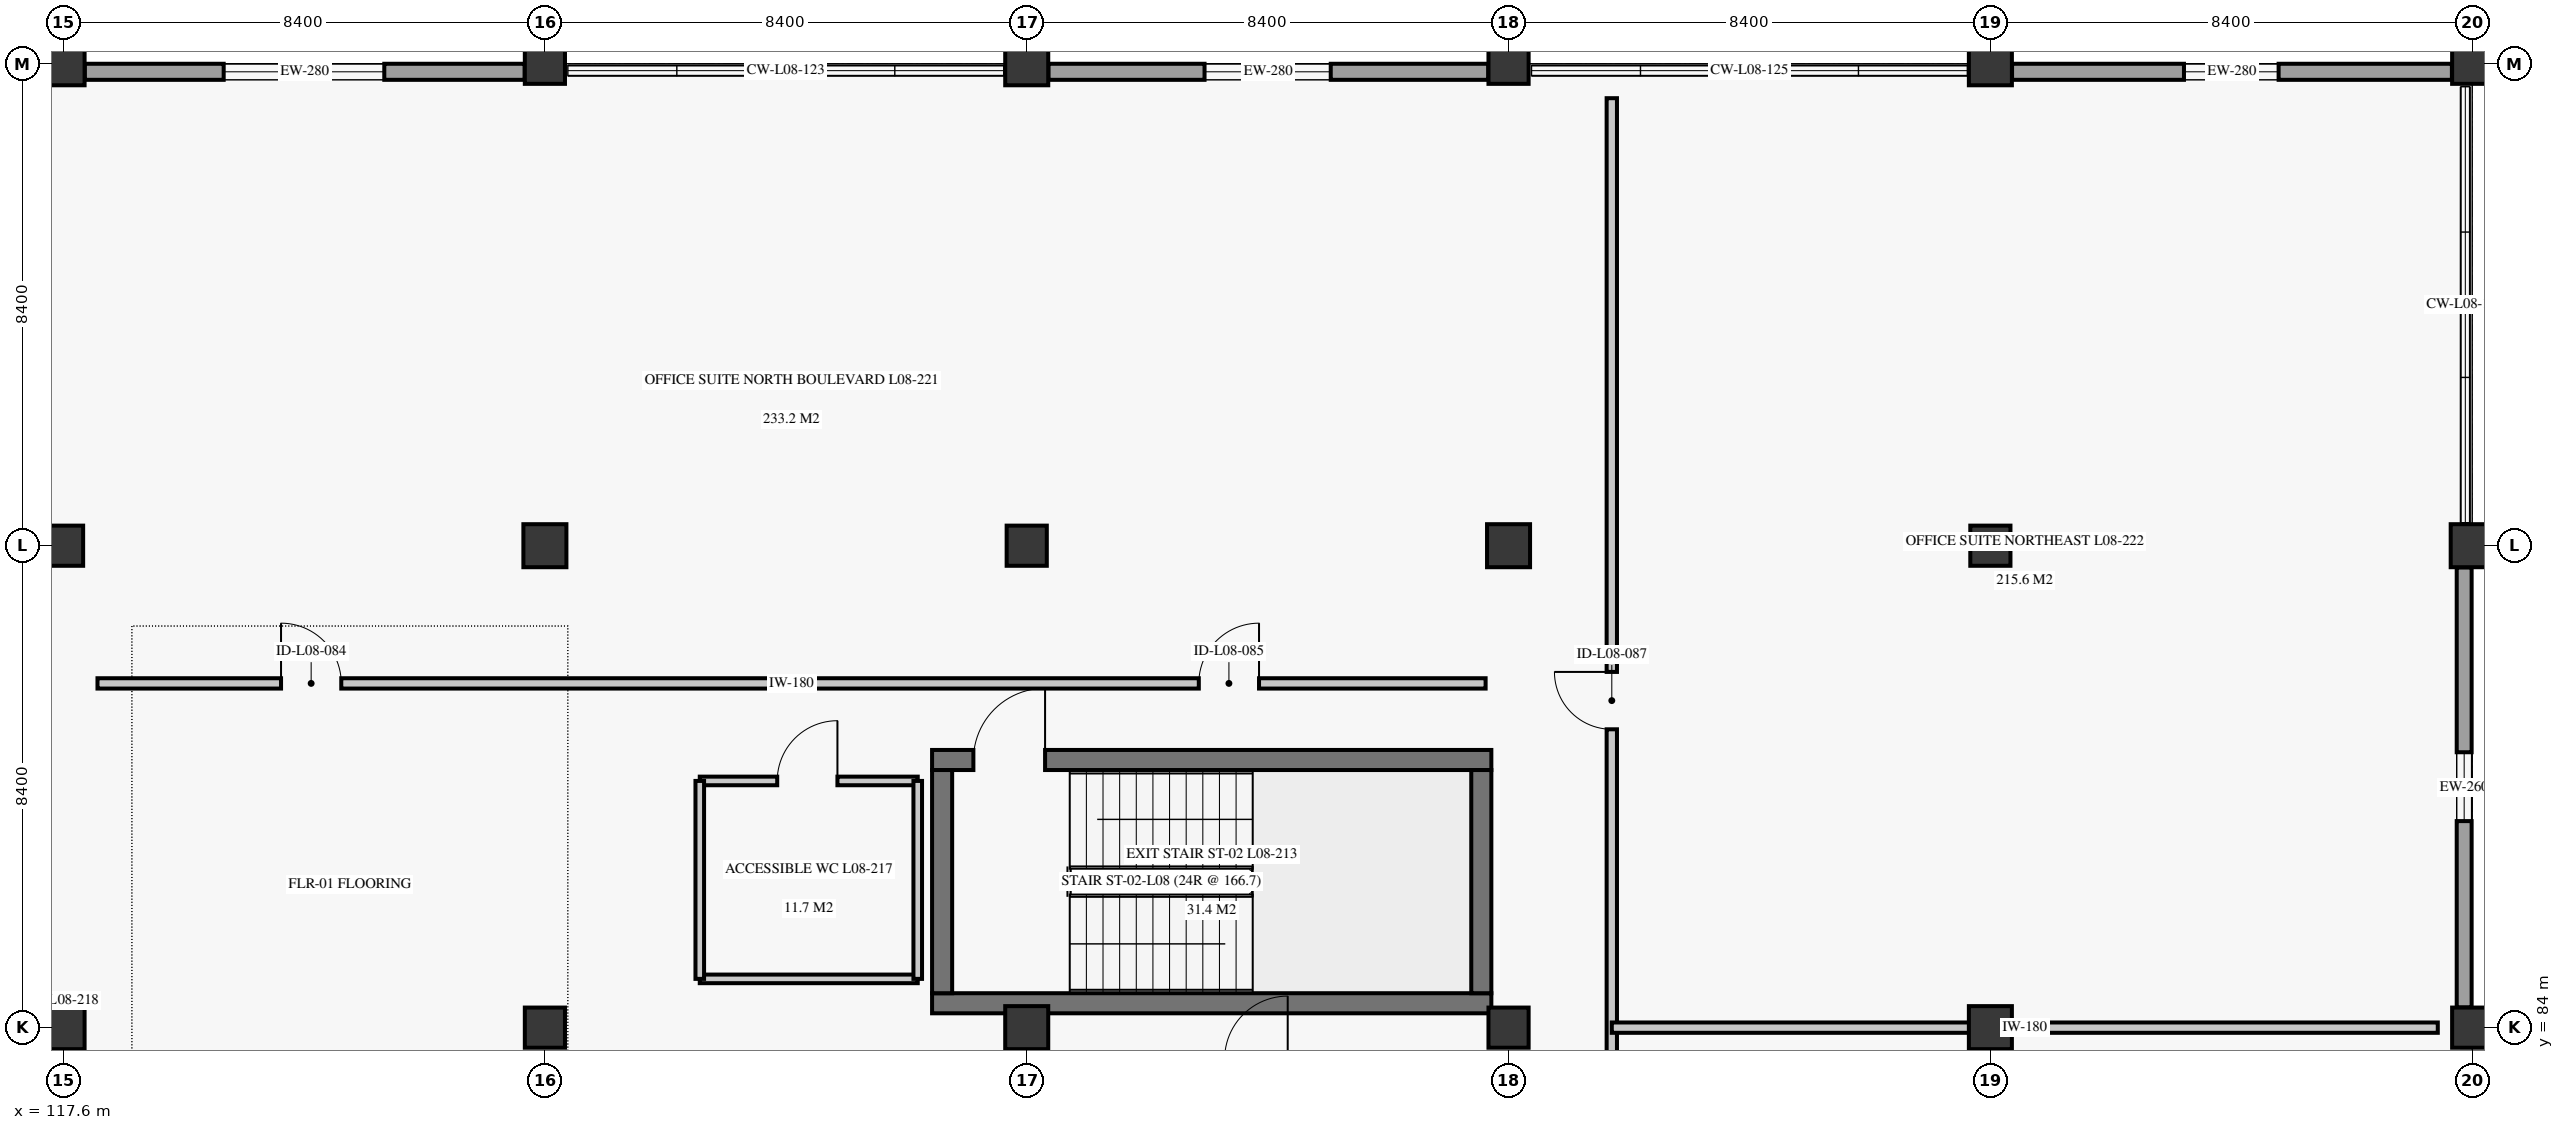
"""IFC4 building model, lengths in metres.
Left out: names, types, materials, properties, quantities, classifications, styles, units other than length and angle.
Written with IfcOpenShell. Run it as: python <this file> out.ifc"""

import sys

from ifc_helpers import new_model, si_unit, direction, frame, frame_2d, origin, origin_2d, place, context, subcontext, project, spatial, rectangle, extrude, element, fill, save


model = new_model("IFC4")
c1 = context("Model", 3, precision=1e-05, world=origin(), true_north=direction((0.0, 1.0)))
c2 = subcontext(c1, "Body", "Model", "MODEL_VIEW")
j1 = project(units=[si_unit("LENGTHUNIT", "METRE"), si_unit("PLANEANGLEUNIT", "RADIAN")], contexts=[c1])
p1 = place(None, origin())
s1 = spatial("IfcSite", under=j1, at=p1, CompositionType="ELEMENT")
p2 = place(p1, origin())
s2 = spatial("IfcBuilding", under=s1, at=p2, CompositionType="ELEMENT")
p3 = place(p2, frame((0.0, 0.0, 34.7)))
s3 = spatial("IfcBuildingStorey", under=s2, at=p3, CompositionType="ELEMENT", Elevation=34.7)
p4 = place(p3, frame((117.6, 84.0, 0.0), z_axis=(0.0, 0.0, 1.0), x_axis=(1.0, 0.0, 0.0)))
e1 = element("IfcColumn", 1, at=p4, inside=s3, PredefinedType="COLUMN", context=c2, shape_type="SweptSolid", body=[
    extrude(rectangle(XDim=0.75, YDim=0.75, at=origin_2d()), origin(), (0.0, 0.0, 1.0), 3.72),
])
p5 = place(p3, frame((117.6, 92.4, 0.0), z_axis=(0.0, 0.0, 1.0), x_axis=(1.0, 0.0, 0.0)))
e2 = element("IfcColumn", 2, at=p5, inside=s3, PredefinedType="COLUMN", context=c2, shape_type="SweptSolid", body=[
    extrude(rectangle(XDim=0.7, YDim=0.7, at=origin_2d()), origin(), (0.0, 0.0, 1.0), 3.72),
])
p6 = place(p3, frame((117.6, 100.8, 0.0), z_axis=(0.0, 0.0, 1.0), x_axis=(1.0, 0.0, 0.0)))
e3 = element("IfcColumn", 3, at=p6, inside=s3, PredefinedType="COLUMN", context=c2, shape_type="SweptSolid", body=[
    extrude(rectangle(XDim=0.75, YDim=0.75, at=origin_2d()), origin(), (0.0, 0.0, 1.0), 3.72),
])
p7 = place(p3, frame((126.0, 84.0, 0.0), z_axis=(0.0, 0.0, 1.0), x_axis=(1.0, 0.0, 0.0)))
e4 = element("IfcColumn", 4, at=p7, inside=s3, PredefinedType="COLUMN", context=c2, shape_type="SweptSolid", body=[
    extrude(rectangle(XDim=0.7, YDim=0.7, at=origin_2d()), origin(), (0.0, 0.0, 1.0), 3.72),
])
p8 = place(p3, frame((126.0, 92.4, 0.0), z_axis=(0.0, 0.0, 1.0), x_axis=(1.0, 0.0, 0.0)))
e5 = element("IfcColumn", 5, at=p8, inside=s3, PredefinedType="COLUMN", context=c2, shape_type="SweptSolid", body=[
    extrude(rectangle(XDim=0.75, YDim=0.75, at=origin_2d()), origin(), (0.0, 0.0, 1.0), 3.72),
])
p9 = place(p3, frame((126.0, 100.8, 0.0), z_axis=(0.0, 0.0, 1.0), x_axis=(1.0, 0.0, 0.0)))
e6 = element("IfcColumn", 6, at=p9, inside=s3, PredefinedType="COLUMN", context=c2, shape_type="SweptSolid", body=[
    extrude(rectangle(XDim=0.7, YDim=0.7, at=origin_2d()), origin(), (0.0, 0.0, 1.0), 3.72),
])
p10 = place(p3, frame((134.4, 84.0, 0.0), z_axis=(0.0, 0.0, 1.0), x_axis=(1.0, 0.0, 0.0)))
e7 = element("IfcColumn", 7, at=p10, inside=s3, PredefinedType="COLUMN", context=c2, shape_type="SweptSolid", body=[
    extrude(rectangle(XDim=0.75, YDim=0.75, at=origin_2d()), origin(), (0.0, 0.0, 1.0), 3.72),
])
p11 = place(p3, frame((134.4, 92.4, 0.0), z_axis=(0.0, 0.0, 1.0), x_axis=(1.0, 0.0, 0.0)))
e8 = element("IfcColumn", 8, at=p11, inside=s3, PredefinedType="COLUMN", context=c2, shape_type="SweptSolid", body=[
    extrude(rectangle(XDim=0.7, YDim=0.7, at=origin_2d()), origin(), (0.0, 0.0, 1.0), 3.72),
])
p12 = place(p3, frame((134.4, 100.8, 0.0), z_axis=(0.0, 0.0, 1.0), x_axis=(1.0, 0.0, 0.0)))
e9 = element("IfcColumn", 9, at=p12, inside=s3, PredefinedType="COLUMN", context=c2, shape_type="SweptSolid", body=[
    extrude(rectangle(XDim=0.75, YDim=0.75, at=origin_2d()), origin(), (0.0, 0.0, 1.0), 3.72),
])
p13 = place(p3, frame((142.8, 84.0, 0.0), z_axis=(0.0, 0.0, 1.0), x_axis=(1.0, 0.0, 0.0)))
e10 = element("IfcColumn", 10, at=p13, inside=s3, PredefinedType="COLUMN", context=c2, shape_type="SweptSolid", body=[
    extrude(rectangle(XDim=0.7, YDim=0.7, at=origin_2d()), origin(), (0.0, 0.0, 1.0), 3.72),
])
p14 = place(p3, frame((142.8, 92.4, 0.0), z_axis=(0.0, 0.0, 1.0), x_axis=(1.0, 0.0, 0.0)))
e11 = element("IfcColumn", 11, at=p14, inside=s3, PredefinedType="COLUMN", context=c2, shape_type="SweptSolid", body=[
    extrude(rectangle(XDim=0.75, YDim=0.75, at=origin_2d()), origin(), (0.0, 0.0, 1.0), 3.72),
])
p15 = place(p3, frame((142.8, 100.8, 0.0), z_axis=(0.0, 0.0, 1.0), x_axis=(1.0, 0.0, 0.0)))
e12 = element("IfcColumn", 12, at=p15, inside=s3, PredefinedType="COLUMN", context=c2, shape_type="SweptSolid", body=[
    extrude(rectangle(XDim=0.7, YDim=0.7, at=origin_2d()), origin(), (0.0, 0.0, 1.0), 3.72),
])
p16 = place(p3, frame((151.2, 84.0, 0.0), z_axis=(0.0, 0.0, 1.0), x_axis=(1.0, 0.0, 0.0)))
e13 = element("IfcColumn", 13, at=p16, inside=s3, PredefinedType="COLUMN", context=c2, shape_type="SweptSolid", body=[
    extrude(rectangle(XDim=0.75, YDim=0.75, at=origin_2d()), origin(), (0.0, 0.0, 1.0), 3.72),
])
p17 = place(p3, frame((151.2, 92.4, 0.0), z_axis=(0.0, 0.0, 1.0), x_axis=(1.0, 0.0, 0.0)))
e14 = element("IfcColumn", 14, at=p17, inside=s3, PredefinedType="COLUMN", context=c2, shape_type="SweptSolid", body=[
    extrude(rectangle(XDim=0.7, YDim=0.7, at=origin_2d()), origin(), (0.0, 0.0, 1.0), 3.72),
])
p18 = place(p3, frame((151.2, 100.8, 0.0), z_axis=(0.0, 0.0, 1.0), x_axis=(1.0, 0.0, 0.0)))
e15 = element("IfcColumn", 15, at=p18, inside=s3, PredefinedType="COLUMN", context=c2, shape_type="SweptSolid", body=[
    extrude(rectangle(XDim=0.75, YDim=0.75, at=origin_2d()), origin(), (0.0, 0.0, 1.0), 3.72),
])
p19 = place(p3, frame((159.6, 84.0, 0.0), z_axis=(0.0, 0.0, 1.0), x_axis=(1.0, 0.0, 0.0)))
e16 = element("IfcColumn", 16, at=p19, inside=s3, PredefinedType="COLUMN", context=c2, shape_type="SweptSolid", body=[
    extrude(rectangle(XDim=0.7, YDim=0.7, at=origin_2d()), origin(), (0.0, 0.0, 1.0), 3.72),
])
p20 = place(p3, frame((159.6, 92.4, 0.0), z_axis=(0.0, 0.0, 1.0), x_axis=(1.0, 0.0, 0.0)))
e17 = element("IfcColumn", 17, at=p20, inside=s3, PredefinedType="COLUMN", context=c2, shape_type="SweptSolid", body=[
    extrude(rectangle(XDim=0.75, YDim=0.75, at=origin_2d()), origin(), (0.0, 0.0, 1.0), 3.72),
])
p21 = place(p3, frame((159.6, 100.8, 0.0), z_axis=(0.0, 0.0, 1.0), x_axis=(1.0, 0.0, 0.0)))
e18 = element("IfcColumn", 18, at=p21, inside=s3, PredefinedType="COLUMN", context=c2, shape_type="SweptSolid", body=[
    extrude(rectangle(XDim=0.7, YDim=0.7, at=origin_2d()), origin(), (0.0, 0.0, 1.0), 3.72),
])
p22 = place(p3, frame((117.978, 100.66, 0.0), z_axis=(0.0, 0.0, 1.0), x_axis=(1.0, 0.0, 0.0)))
e19 = element("IfcWall", 19, at=p22, inside=s3, PredefinedType="SOLIDWALL", context=c2, shape_type="SweptSolid", body=[
    extrude(rectangle(XDim=7.67, YDim=0.28, at=frame_2d((3.835, 0.0))), origin(), (0.0, 0.0, 1.0), 3.04),
])
p23 = place(p22, frame((2.422, 0.0, 0.85)))
e20 = element("IfcOpeningElement", 20, at=p23, cuts=e19, PredefinedType="OPENING", context=c2, shape_type="SweptSolid", body=[
    extrude(rectangle(XDim=2.8, YDim=1.85, at=frame_2d((1.4, 0.925))), frame((0.0, 0.15, 0.0), z_axis=(0.0, -1.0, 0.0), x_axis=(1.0, 0.0, 0.0)), (0.0, 0.0, 1.0), 0.3),
])
p24 = place(p3, frame((134.778, 100.66, 0.0), z_axis=(0.0, 0.0, 1.0), x_axis=(1.0, 0.0, 0.0)))
e21 = element("IfcWall", 21, at=p24, inside=s3, PredefinedType="SOLIDWALL", context=c2, shape_type="SweptSolid", body=[
    extrude(rectangle(XDim=7.668, YDim=0.28, at=frame_2d((3.834, 0.0))), origin(), (0.0, 0.0, 1.0), 3.04),
])
p25 = place(p24, frame((2.722, 0.0, 0.85)))
e22 = element("IfcOpeningElement", 22, at=p25, cuts=e21, PredefinedType="OPENING", context=c2, shape_type="SweptSolid", body=[
    extrude(rectangle(XDim=2.2, YDim=1.8, at=frame_2d((1.1, 0.9))), frame((0.0, 0.15, 0.0), z_axis=(0.0, -1.0, 0.0), x_axis=(1.0, 0.0, 0.0)), (0.0, 0.0, 1.0), 0.3),
])
p26 = place(p3, frame((151.578, 100.66, 0.0), z_axis=(0.0, 0.0, 1.0), x_axis=(1.0, 0.0, 0.0)))
e23 = element("IfcWall", 23, at=p26, inside=s3, PredefinedType="SOLIDWALL", context=c2, shape_type="SweptSolid", body=[
    extrude(rectangle(XDim=7.668, YDim=0.28, at=frame_2d((3.834, 0.0))), origin(), (0.0, 0.0, 1.0), 3.04),
])
p27 = place(p26, frame((2.997, 0.0, 0.85)))
e24 = element("IfcOpeningElement", 24, at=p27, cuts=e23, PredefinedType="OPENING", context=c2, shape_type="SweptSolid", body=[
    extrude(rectangle(XDim=1.65, YDim=1.75, at=frame_2d((0.825, 0.875))), frame((0.0, 0.15, 0.0), z_axis=(0.0, -1.0, 0.0), x_axis=(1.0, 0.0, 0.0)), (0.0, 0.0, 1.0), 0.3),
])
p28 = place(p3, frame((159.46, 84.352, 0.0), z_axis=(0.0, 0.0, 1.0), x_axis=(0.0, 1.0, 0.0)))
e25 = element("IfcWall", 25, at=p28, inside=s3, PredefinedType="SOLIDWALL", context=c2, shape_type="SweptSolid", body=[
    extrude(rectangle(XDim=7.67, YDim=0.26, at=frame_2d((3.835, 0.0))), origin(), (0.0, 0.0, 1.0), 3.04),
])
p29 = place(p28, frame((3.248, 0.0, 0.85)))
e26 = element("IfcOpeningElement", 26, at=p29, cuts=e25, PredefinedType="OPENING", context=c2, shape_type="SweptSolid", body=[
    extrude(rectangle(XDim=1.2, YDim=1.6, at=frame_2d((0.6, 0.8))), frame((0.0, 0.14, 0.0), z_axis=(0.0, -1.0, 0.0), x_axis=(1.0, 0.0, 0.0)), (0.0, 0.0, 1.0), 0.28),
])
p30 = place(p3, frame((132.75, 84.425, 0.0), z_axis=(0.0, 0.0, 1.0), x_axis=(1.0, 0.0, 0.0)))
e27 = element("IfcWall", 27, at=p30, inside=s3, PredefinedType="SHEAR", context=c2, shape_type="SweptSolid", body=[
    extrude(rectangle(XDim=9.75, YDim=0.35, at=frame_2d((4.875, 0.0))), origin(), (0.0, 0.0, 1.0), 3.72),
])
p31 = place(p3, frame((132.75, 88.665, 0.0), z_axis=(0.0, 0.0, 1.0), x_axis=(1.0, 0.0, 0.0)))
e28 = element("IfcWall", 28, at=p31, inside=s3, PredefinedType="SHEAR", context=c2, shape_type="SweptSolid", body=[
    extrude(rectangle(XDim=9.75, YDim=0.35, at=frame_2d((4.875, 0.0))), origin(), (0.0, 0.0, 1.0), 3.72),
])
p32 = place(p31, frame((0.72, 0.0, 0.0)))
e29 = element("IfcOpeningElement", 29, at=p32, cuts=e28, PredefinedType="OPENING", context=c2, shape_type="SweptSolid", body=[
    extrude(rectangle(XDim=1.25, YDim=2.2, at=frame_2d((0.625, 1.1))), frame((0.0, 0.185, 0.0), z_axis=(0.0, -1.0, 0.0), x_axis=(1.0, 0.0, 0.0)), (0.0, 0.0, 1.0), 0.37),
])
for number, where, z_axis, x_axis in (
    (30, (132.925, 84.6, 0.0), (0.0, 0.0, 1.0), (0.0, 1.0, 0.0)),
    (31, (142.325, 84.6, 0.0), (0.0, 0.0, 1.0), (0.0, 1.0, 0.0)),
):
    element("IfcWall", number, at=place(p3, frame(where, z_axis=z_axis, x_axis=x_axis)), inside=s3, PredefinedType="SHEAR", context=c2, shape_type="SweptSolid", body=[
        extrude(rectangle(XDim=3.89, YDim=0.35, at=frame_2d((1.945, 0.0))), origin(), (0.0, 0.0, 1.0), 3.72),
    ])
p33 = place(p3, frame((128.7, 88.3, 0.0), z_axis=(0.0, 0.0, 1.0), x_axis=(1.0, 0.0, 0.0)))
e32 = element("IfcWall", 32, at=p33, inside=s3, PredefinedType="PARTITIONING", context=c2, shape_type="SweptSolid", body=[
    extrude(rectangle(XDim=3.8, YDim=0.15, at=frame_2d((1.9, 0.0))), origin(), (0.0, 0.0, 1.0), 3.34),
])
p34 = place(p33, frame((1.35, 0.0, 0.0)))
e33 = element("IfcOpeningElement", 33, at=p34, cuts=e32, PredefinedType="OPENING", context=c2, shape_type="SweptSolid", body=[
    extrude(rectangle(XDim=1.05, YDim=2.15, at=frame_2d((0.525, 1.075))), frame((0.0, 0.085, 0.0), z_axis=(0.0, -1.0, 0.0), x_axis=(1.0, 0.0, 0.0)), (0.0, 0.0, 1.0), 0.17),
])
p35 = place(p3, frame((128.7, 84.85, 0.0), z_axis=(0.0, 0.0, 1.0), x_axis=(1.0, 0.0, 0.0)))
e34 = element("IfcWall", 34, at=p35, inside=s3, PredefinedType="PARTITIONING", context=c2, shape_type="SweptSolid", body=[
    extrude(rectangle(XDim=3.8, YDim=0.15, at=frame_2d((1.9, 0.0))), origin(), (0.0, 0.0, 1.0), 3.34),
])
for number, where, z_axis, x_axis in (
    (35, (128.7, 84.85, 0.0), (0.0, 0.0, 1.0), (0.0, 1.0, 0.0)),
    (36, (132.5, 84.85, 0.0), (0.0, 0.0, 1.0), (0.0, 1.0, 0.0)),
):
    element("IfcWall", number, at=place(p3, frame(where, z_axis=z_axis, x_axis=x_axis)), inside=s3, PredefinedType="PARTITIONING", context=c2, shape_type="SweptSolid", body=[
        extrude(rectangle(XDim=3.45, YDim=0.15, at=frame_2d((1.725, 0.0))), origin(), (0.0, 0.0, 1.0), 3.34),
    ])
p36 = place(p3, frame((118.2, 90.0, 0.0), z_axis=(0.0, 0.0, 1.0), x_axis=(1.0, 0.0, 0.0)))
e37 = element("IfcWall", 37, at=p36, inside=s3, PredefinedType="PARTITIONING", context=c2, shape_type="SweptSolid", body=[
    extrude(rectangle(XDim=24.2, YDim=0.18, at=frame_2d((12.1, 0.0))), origin(), (0.0, 0.0, 1.0), 3.34),
])
p37 = place(p36, frame((3.2, 0.0, 0.0)))
e38 = element("IfcOpeningElement", 38, at=p37, cuts=e37, PredefinedType="OPENING", context=c2, shape_type="SweptSolid", body=[
    extrude(rectangle(XDim=1.05, YDim=2.2, at=frame_2d((0.525, 1.1))), frame((0.0, 0.1, 0.0), z_axis=(0.0, -1.0, 0.0), x_axis=(1.0, 0.0, 0.0)), (0.0, 0.0, 1.0), 0.2),
])
p38 = place(p36, frame((19.2, 0.0, 0.0)))
e39 = element("IfcOpeningElement", 39, at=p38, cuts=e37, PredefinedType="OPENING", context=c2, shape_type="SweptSolid", body=[
    extrude(rectangle(XDim=1.05, YDim=2.2, at=frame_2d((0.525, 1.1))), frame((0.0, 0.1, 0.0), z_axis=(0.0, -1.0, 0.0), x_axis=(1.0, 0.0, 0.0)), (0.0, 0.0, 1.0), 0.2),
])
p39 = place(p3, frame((144.6, 67.8, 0.0), z_axis=(0.0, 0.0, 1.0), x_axis=(0.0, 1.0, 0.0)))
e40 = element("IfcWall", 40, at=p39, inside=s3, PredefinedType="PARTITIONING", context=c2, shape_type="SweptSolid", body=[
    extrude(rectangle(XDim=32.4, YDim=0.18, at=frame_2d((16.2, 0.0))), origin(), (0.0, 0.0, 1.0), 3.34),
])
p40 = place(p39, frame((4.2, 0.0, 0.0)))
e41 = element("IfcOpeningElement", 41, at=p40, cuts=e40, PredefinedType="OPENING", context=c2, shape_type="SweptSolid", body=[
    extrude(rectangle(XDim=1.0, YDim=2.15, at=frame_2d((0.5, 1.075))), frame((0.0, 0.1, 0.0), z_axis=(0.0, -1.0, 0.0), x_axis=(1.0, 0.0, 0.0)), (0.0, 0.0, 1.0), 0.2),
])
p41 = place(p39, frame((21.4, 0.0, 0.0)))
e42 = element("IfcOpeningElement", 42, at=p41, cuts=e40, PredefinedType="OPENING", context=c2, shape_type="SweptSolid", body=[
    extrude(rectangle(XDim=1.0, YDim=2.15, at=frame_2d((0.5, 1.075))), frame((0.0, 0.1, 0.0), z_axis=(0.0, -1.0, 0.0), x_axis=(1.0, 0.0, 0.0)), (0.0, 0.0, 1.0), 0.2),
])
p42 = place(p3, frame((144.6, 84.0, 0.0), z_axis=(0.0, 0.0, 1.0), x_axis=(1.0, 0.0, 0.0)))
e43 = element("IfcWall", 43, at=p42, inside=s3, PredefinedType="PARTITIONING", context=c2, shape_type="SweptSolid", body=[
    extrude(rectangle(XDim=14.4, YDim=0.18, at=frame_2d((7.2, 0.0))), origin(), (0.0, 0.0, 1.0), 3.34),
])
p43 = place(p23, origin())
e44 = element("IfcWindow", 44, at=p43, inside=s3, PartitioningType="SINGLE_PANEL", PredefinedType="WINDOW", context=c2, shape_type="SweptSolid", body=[
    extrude(rectangle(XDim=2.8, YDim=1.85, at=frame_2d((1.4, 0.925))), frame((0.0, 0.03, 0.0), z_axis=(0.0, -1.0, 0.0), x_axis=(1.0, 0.0, 0.0)), (0.0, 0.0, 1.0), 0.06),
])
fill(e20, e44)
p44 = place(p25, origin())
e45 = element("IfcWindow", 45, at=p44, inside=s3, PartitioningType="SINGLE_PANEL", PredefinedType="WINDOW", context=c2, shape_type="SweptSolid", body=[
    extrude(rectangle(XDim=2.2, YDim=1.8, at=frame_2d((1.1, 0.9))), frame((0.0, 0.03, 0.0), z_axis=(0.0, -1.0, 0.0), x_axis=(1.0, 0.0, 0.0)), (0.0, 0.0, 1.0), 0.06),
])
fill(e22, e45)
p45 = place(p27, origin())
e46 = element("IfcWindow", 46, at=p45, inside=s3, PartitioningType="SINGLE_PANEL", PredefinedType="WINDOW", context=c2, shape_type="SweptSolid", body=[
    extrude(rectangle(XDim=1.65, YDim=1.75, at=frame_2d((0.825, 0.875))), frame((0.0, 0.03, 0.0), z_axis=(0.0, -1.0, 0.0), x_axis=(1.0, 0.0, 0.0)), (0.0, 0.0, 1.0), 0.06),
])
fill(e24, e46)
p46 = place(p29, origin())
e47 = element("IfcWindow", 47, at=p46, inside=s3, PartitioningType="SINGLE_PANEL", PredefinedType="WINDOW", context=c2, shape_type="SweptSolid", body=[
    extrude(rectangle(XDim=1.2, YDim=1.6, at=frame_2d((0.6, 0.8))), frame((0.0, 0.03, 0.0), z_axis=(0.0, -1.0, 0.0), x_axis=(1.0, 0.0, 0.0)), (0.0, 0.0, 1.0), 0.06),
])
fill(e26, e47)
p47 = place(p32, origin())
e48 = element("IfcDoor", 48, at=p47, inside=s3, OperationType="SINGLE_SWING_RIGHT", PredefinedType="DOOR", context=c2, shape_type="SweptSolid", body=[
    extrude(rectangle(XDim=1.25, YDim=2.2, at=frame_2d((0.625, 1.1))), frame((0.0, 0.025, 0.0), z_axis=(0.0, -1.0, 0.0), x_axis=(1.0, 0.0, 0.0)), (0.0, 0.0, 1.0), 0.05),
])
fill(e29, e48)
p48 = place(p34, origin())
e49 = element("IfcDoor", 49, at=p48, inside=s3, OperationType="SINGLE_SWING_RIGHT", PredefinedType="DOOR", context=c2, shape_type="SweptSolid", body=[
    extrude(rectangle(XDim=1.05, YDim=2.15, at=frame_2d((0.525, 1.075))), frame((0.0, 0.025, 0.0), z_axis=(0.0, -1.0, 0.0), x_axis=(1.0, 0.0, 0.0)), (0.0, 0.0, 1.0), 0.05),
])
fill(e33, e49)
p49 = place(p37, origin())
e50 = element("IfcDoor", 50, at=p49, inside=s3, OperationType="SINGLE_SWING_LEFT", PredefinedType="DOOR", context=c2, shape_type="SweptSolid", body=[
    extrude(rectangle(XDim=1.05, YDim=2.2, at=frame_2d((0.525, 1.1))), frame((0.0, 0.025, 0.0), z_axis=(0.0, -1.0, 0.0), x_axis=(1.0, 0.0, 0.0)), (0.0, 0.0, 1.0), 0.05),
])
fill(e38, e50)
p50 = place(p38, origin())
e51 = element("IfcDoor", 51, at=p50, inside=s3, OperationType="SINGLE_SWING_RIGHT", PredefinedType="DOOR", context=c2, shape_type="SweptSolid", body=[
    extrude(rectangle(XDim=1.05, YDim=2.2, at=frame_2d((0.525, 1.1))), frame((0.0, 0.025, 0.0), z_axis=(0.0, -1.0, 0.0), x_axis=(1.0, 0.0, 0.0)), (0.0, 0.0, 1.0), 0.05),
])
fill(e39, e51)
p51 = place(p41, origin())
e52 = element("IfcDoor", 52, at=p51, inside=s3, OperationType="SINGLE_SWING_RIGHT", PredefinedType="DOOR", context=c2, shape_type="SweptSolid", body=[
    extrude(rectangle(XDim=1.0, YDim=2.15, at=frame_2d((0.5, 1.075))), frame((0.0, 0.025, 0.0), z_axis=(0.0, -1.0, 0.0), x_axis=(1.0, 0.0, 0.0)), (0.0, 0.0, 1.0), 0.05),
])
fill(e42, e52)
save(model, sys.argv[1])
